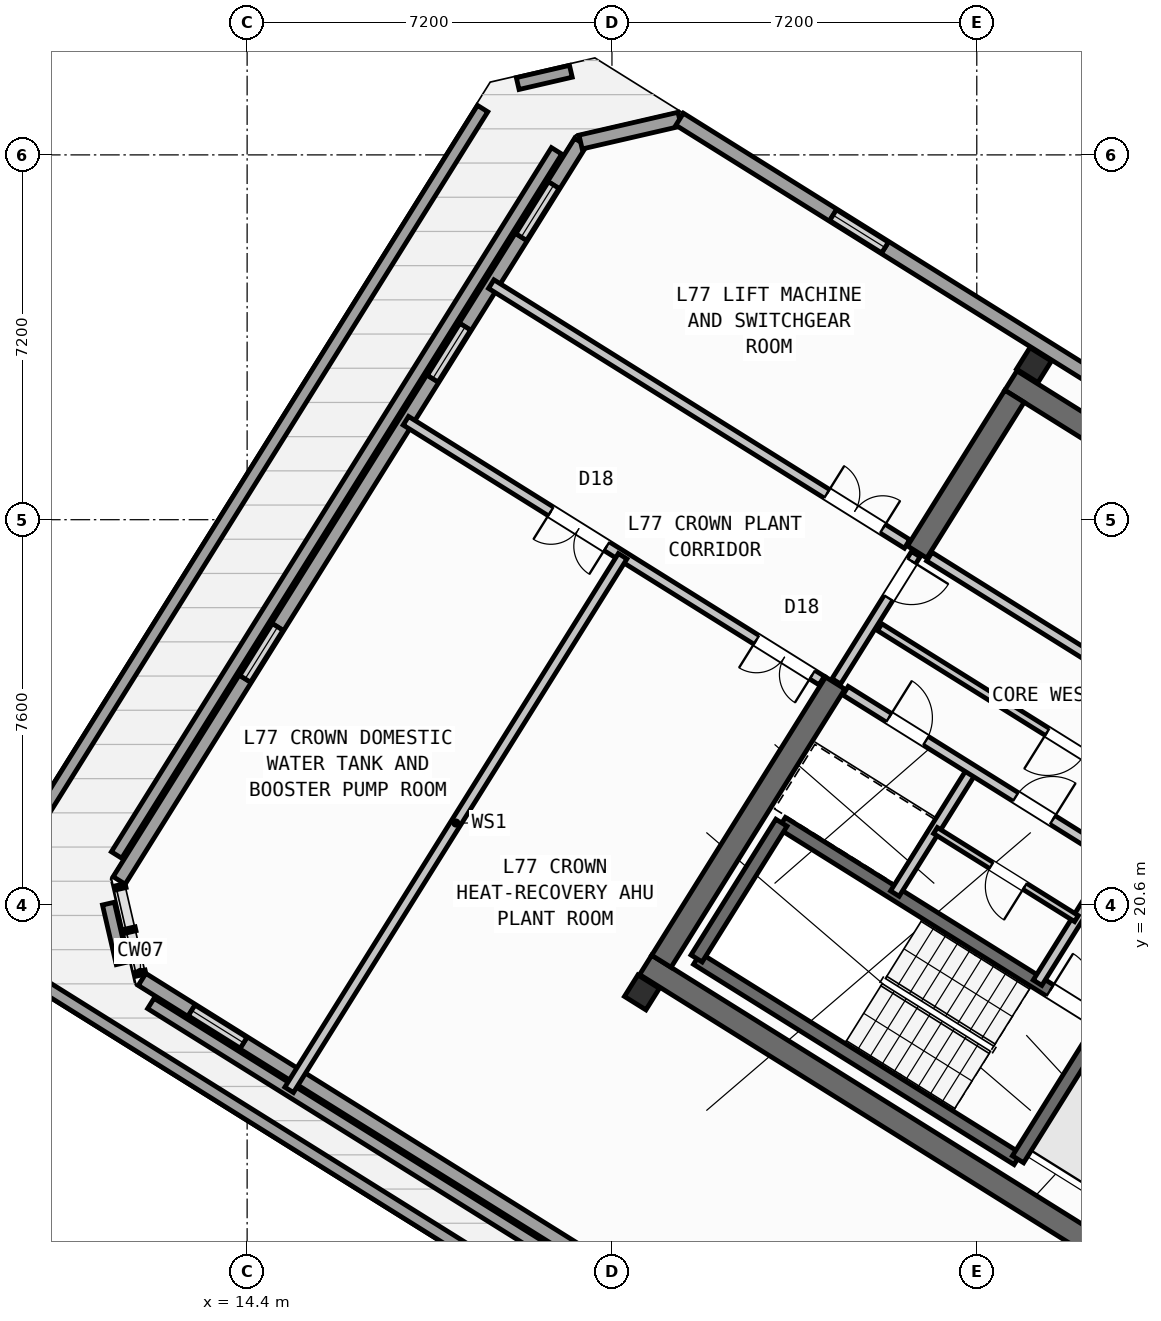
"""IFC4 building model, lengths in metres.
Left out: names, types, materials, properties, quantities, classifications, styles, units other than length and angle.
Written with IfcOpenShell. Run it as: python <this file> out.ifc"""

import sys

from ifc_helpers import new_model, si_unit, direction, frame, frame_2d, origin, origin_2d, place, context, subcontext, project, spatial, rectangle, hollow_rectangle, extrude, source, transform, mapped, element, fill, save


model = new_model("IFC4")
c1 = context("Model", 3, precision=1e-05, world=origin(), true_north=direction((0.0, 1.0)))
c2 = subcontext(c1, "Body", "Model", "MODEL_VIEW")
j1 = project(units=[si_unit("LENGTHUNIT", "METRE"), si_unit("PLANEANGLEUNIT", "RADIAN")], contexts=[c1])
p1 = place(None, origin())
s1 = spatial("IfcSite", under=j1, at=p1, CompositionType="ELEMENT")
p2 = place(p1, origin())
s2 = spatial("IfcBuilding", under=s1, at=p2, CompositionType="ELEMENT")
p3 = place(p2, frame((0.0, 0.0, 302.4)))
s3 = spatial("IfcBuildingStorey", under=s2, at=p3, CompositionType="ELEMENT", Elevation=302.4)
p4 = place(p3, frame((40.531, 24.036, 0.0), z_axis=(0.0, 0.0, 1.0), x_axis=(-0.848048787466, 0.529918157905, 0.0)))
e1 = element("IfcWall", 1, at=p4, inside=s3, PredefinedType="SHEAR", context=c2, shape_type="SweptSolid", body=[
    extrude(rectangle(XDim=13.04, YDim=0.45, at=frame_2d((6.52, 0.0))), origin(), (0.0, 0.0, 1.0), 3.32),
])
p5 = place(p3, frame((33.324, 12.503, 0.0), z_axis=(0.0, 0.0, 1.0), x_axis=(-0.848043529849, 0.529926571782, 0.0)))
e2 = element("IfcWall", 2, at=p5, inside=s3, PredefinedType="SHEAR", context=c2, shape_type="SweptSolid", body=[
    extrude(rectangle(XDim=13.04, YDim=0.45, at=frame_2d((6.52, 0.0))), origin(), (0.0, 0.0, 1.0), 3.32),
])
p6 = place(p3, frame((29.544, 30.636, 0.0), z_axis=(0.0, 0.0, 1.0), x_axis=(-0.529902075036, -0.848058836916, 0.0)))
e3 = element("IfcWall", 3, at=p6, inside=s3, PredefinedType="SHEAR", context=c2, shape_type="SweptSolid", body=[
    extrude(rectangle(XDim=3.625, YDim=0.45, at=frame_2d((1.812, 0.0))), origin(), (0.0, 0.0, 1.0), 3.32),
])
p7 = place(p3, frame((26.007, 24.976, 0.0), z_axis=(0.0, 0.0, 1.0), x_axis=(-0.529931155655, -0.848040665456, 0.0)))
e4 = element("IfcWall", 4, at=p7, inside=s3, PredefinedType="SHEAR", context=c2, shape_type="SweptSolid", body=[
    extrude(rectangle(XDim=6.475, YDim=0.45, at=frame_2d((3.238, 0.0))), origin(), (0.0, 0.0, 1.0), 3.32),
])
m1 = source(origin(), c2, "Body", "SweptSolid", [
    extrude(hollow_rectangle(XDim=0.5, YDim=0.5, WallThickness=0.025, at=origin_2d()), origin(), (0.0, 0.0, 1.0), 3.6),
])
for number, where, z_axis, x_axis in (
    (5, (29.928, 31.251, 0.0), (0.0, 0.0, 1.0), (-0.848, 0.53, 0.0)),
    (6, (22.191, 18.87, 0.0), (0.0, 0.0, 1.0), (-0.848, 0.53, 0.0)),
):
    element("IfcColumn", number, at=place(p3, frame(where, z_axis=z_axis, x_axis=x_axis)), inside=s3, PredefinedType="COLUMN", context=c2, shape_type="MappedRepresentation", body=[
        mapped(m1, transform((0.0, 0.0, 0.0), scale=1.0)),
    ])
p8 = place(p3, frame((29.124, 7.286, 0.0), z_axis=(0.0, 0.0, 1.0), x_axis=(-0.848048671495, 0.529918343499, 0.0)))
e7 = element("IfcWall", 7, at=p8, inside=s3, PredefinedType="PARAPET", context=c2, shape_type="SweptSolid", body=[
    extrude(rectangle(XDim=22.056, YDim=0.24, at=frame_2d((11.028, 0.0))), origin(), (0.0, 0.0, 1.0), 1.15),
])
p9 = place(p3, frame((9.824, 21.553, 0.0), z_axis=(0.0, 0.0, 1.0), x_axis=(0.529923289052, 0.848045581157, 0.0)))
e8 = element("IfcWall", 8, at=p9, inside=s3, PredefinedType="PARAPET", context=c2, shape_type="SweptSolid", body=[
    extrude(rectangle(XDim=17.406, YDim=0.24, at=frame_2d((8.703, 0.0))), origin(), (0.0, 0.0, 1.0), 1.15),
])
p10 = place(p3, frame((19.74, 36.808, 0.0), z_axis=(0.0, 0.0, 1.0), x_axis=(0.974395015602, 0.224842953123, 0.0)))
e9 = element("IfcWall", 9, at=p10, inside=s3, PredefinedType="PARAPET", context=c2, shape_type="SweptSolid", body=[
    extrude(rectangle(XDim=1.077, YDim=0.24, at=frame_2d((0.539, 0.0))), origin(), (0.0, 0.0, 1.0), 1.15),
])
p11 = place(p3, frame((20.507, 35.48, 0.0), z_axis=(0.0, 0.0, 1.0), x_axis=(-0.529914569967, -0.848051029442, 0.0)))
e10 = element("IfcWall", 10, at=p11, inside=s3, PredefinedType="PARAPET", context=c2, shape_type="SweptSolid", body=[
    extrude(rectangle(XDim=16.387, YDim=0.24, at=frame_2d((8.194, 0.0))), origin(), (0.0, 0.0, 1.0), 1.15),
])
p12 = place(p3, frame((11.663, 20.623, 0.0), z_axis=(0.0, 0.0, 1.0), x_axis=(0.224815250156, -0.974401407684, 0.0)))
e11 = element("IfcWall", 11, at=p12, inside=s3, PredefinedType="PARAPET", context=c2, shape_type="SweptSolid", body=[
    extrude(rectangle(XDim=1.209, YDim=0.24, at=frame_2d((0.604, 0.0))), origin(), (0.0, 0.0, 1.0), 1.15),
])
p13 = place(p3, frame((12.5, 18.652, 0.0), z_axis=(0.0, 0.0, 1.0), x_axis=(0.848048578208, -0.529918492789, 0.0)))
e12 = element("IfcWall", 12, at=p13, inside=s3, PredefinedType="PARAPET", context=c2, shape_type="SweptSolid", body=[
    extrude(rectangle(XDim=20.187, YDim=0.24, at=frame_2d((10.094, 0.0))), origin(), (0.0, 0.0, 1.0), 1.15),
])
p14 = place(p3, frame((30.122, 8.007, 0.0), z_axis=(0.0, 0.0, 1.0), x_axis=(-0.848046669074, 0.529921548036, 0.0)))
e13 = element("IfcWall", 13, at=p14, inside=s3, PredefinedType="STANDARD", context=c2, shape_type="SweptSolid", body=[
    extrude(rectangle(XDim=20.984, YDim=0.28, at=frame_2d((10.492, 0.0))), origin(), (0.0, 0.0, 1.0), 3.32),
])
p15 = place(p14, frame((8.009, 0.0, 0.95)))
e14 = element("IfcOpeningElement", 14, at=p15, cuts=e13, PredefinedType="OPENING", context=c2, shape_type="SweptSolid", body=[
    extrude(rectangle(XDim=1.25, YDim=1.4, at=frame_2d((0.625, 0.7))), frame((0.0, 0.15, 0.0), z_axis=(0.0, -1.0, 0.0), x_axis=(1.0, 0.0, 0.0)), (0.0, 0.0, 1.0), 0.3),
])
p16 = place(p14, frame((18.601, 0.0, 0.95)))
e15 = element("IfcOpeningElement", 15, at=p16, cuts=e13, PredefinedType="OPENING", context=c2, shape_type="SweptSolid", body=[
    extrude(rectangle(XDim=1.25, YDim=1.4, at=frame_2d((0.625, 0.7))), frame((0.0, 0.15, 0.0), z_axis=(0.0, -1.0, 0.0), x_axis=(1.0, 0.0, 0.0)), (0.0, 0.0, 1.0), 0.3),
])
p17 = place(p3, frame((11.875, 21.081, 0.0), z_axis=(0.0, 0.0, 1.0), x_axis=(0.529924867514, 0.848044594812, 0.0)))
e16 = element("IfcWall", 16, at=p17, inside=s3, PredefinedType="STANDARD", context=c2, shape_type="SweptSolid", body=[
    extrude(rectangle(XDim=17.184, YDim=0.28, at=frame_2d((8.592, 0.0))), origin(), (0.0, 0.0, 1.0), 3.32),
])
p18 = place(p17, frame((4.671, 0.0, 0.95)))
e17 = element("IfcOpeningElement", 17, at=p18, cuts=e16, PredefinedType="OPENING", context=c2, shape_type="SweptSolid", body=[
    extrude(rectangle(XDim=1.25, YDim=1.4, at=frame_2d((0.625, 0.7))), frame((0.0, 0.15, 0.0), z_axis=(0.0, -1.0, 0.0), x_axis=(1.0, 0.0, 0.0)), (0.0, 0.0, 1.0), 0.3),
])
p19 = place(p17, frame((11.657, 0.0, 0.95)))
e18 = element("IfcOpeningElement", 18, at=p19, cuts=e16, PredefinedType="OPENING", context=c2, shape_type="SweptSolid", body=[
    extrude(rectangle(XDim=1.25, YDim=1.4, at=frame_2d((0.625, 0.7))), frame((0.0, 0.15, 0.0), z_axis=(0.0, -1.0, 0.0), x_axis=(1.0, 0.0, 0.0)), (0.0, 0.0, 1.0), 0.3),
])
p20 = place(p17, frame((14.953, 0.0, 0.95)))
e19 = element("IfcOpeningElement", 19, at=p20, cuts=e16, PredefinedType="OPENING", context=c2, shape_type="SweptSolid", body=[
    extrude(rectangle(XDim=1.25, YDim=1.4, at=frame_2d((0.625, 0.7))), frame((0.0, 0.15, 0.0), z_axis=(0.0, -1.0, 0.0), x_axis=(1.0, 0.0, 0.0)), (0.0, 0.0, 1.0), 0.3),
])
p21 = place(p3, frame((20.981, 35.653, 0.0), z_axis=(0.0, 0.0, 1.0), x_axis=(0.974360407225, 0.224992881738, 0.0)))
e20 = element("IfcWall", 20, at=p21, inside=s3, PredefinedType="STANDARD", context=c2, shape_type="SweptSolid", body=[
    extrude(rectangle(XDim=2.005, YDim=0.28, at=frame_2d((1.003, 0.0))), origin(), (0.0, 0.0, 1.0), 3.32),
])
p22 = place(p3, frame((22.935, 36.104, 0.0), z_axis=(0.0, 0.0, 1.0), x_axis=(0.848046669074, -0.529921548036, 0.0)))
e21 = element("IfcWall", 21, at=p22, inside=s3, PredefinedType="STANDARD", context=c2, shape_type="SweptSolid", body=[
    extrude(rectangle(XDim=20.984, YDim=0.28, at=frame_2d((10.492, 0.0))), origin(), (0.0, 0.0, 1.0), 3.32),
])
p23 = place(p22, frame((3.551, 0.0, 0.95)))
e22 = element("IfcOpeningElement", 22, at=p23, cuts=e21, PredefinedType="OPENING", context=c2, shape_type="SweptSolid", body=[
    extrude(rectangle(XDim=1.25, YDim=1.4, at=frame_2d((0.625, 0.7))), frame((0.0, 0.15, 0.0), z_axis=(0.0, -1.0, 0.0), x_axis=(1.0, 0.0, 0.0)), (0.0, 0.0, 1.0), 0.3),
])
p24 = place(p22, frame((14.193, 0.0, 0.95)))
e23 = element("IfcOpeningElement", 23, at=p24, cuts=e21, PredefinedType="OPENING", context=c2, shape_type="SweptSolid", body=[
    extrude(rectangle(XDim=1.25, YDim=1.4, at=frame_2d((0.625, 0.7))), frame((0.0, 0.15, 0.0), z_axis=(0.0, -1.0, 0.0), x_axis=(1.0, 0.0, 0.0)), (0.0, 0.0, 1.0), 0.3),
])
p25 = place(p3, frame((29.605, 15.581, 0.0), z_axis=(0.0, 0.0, 1.0), x_axis=(-0.848036911448, 0.529937163087, 0.0)))
e24 = element("IfcWall", 24, at=p25, inside=s3, PredefinedType="SHEAR", context=c2, shape_type="SweptSolid", body=[
    extrude(rectangle(XDim=7.46, YDim=0.26, at=frame_2d((3.73, 0.0))), origin(), (0.0, 0.0, 1.0), 3.32),
])
p26 = place(p3, frame((31.28, 18.261, 0.0), z_axis=(0.0, 0.0, 1.0), x_axis=(-0.848051618787, 0.529913626805, 0.0)))
e25 = element("IfcWall", 25, at=p26, inside=s3, PredefinedType="SHEAR", context=c2, shape_type="SweptSolid", body=[
    extrude(rectangle(XDim=7.46, YDim=0.26, at=frame_2d((3.73, 0.0))), origin(), (0.0, 0.0, 1.0), 3.32),
])
p27 = place(p26, frame((0.36, 0.0, 0.0)))
e26 = element("IfcOpeningElement", 26, at=p27, cuts=e25, PredefinedType="OPENING", context=c2, shape_type="SweptSolid", body=[
    extrude(rectangle(XDim=0.86, YDim=2.05, at=frame_2d((0.43, 1.025))), frame((0.0, 0.14, 0.0), z_axis=(0.0, -1.0, 0.0), x_axis=(1.0, 0.0, 0.0)), (0.0, 0.0, 1.0), 0.28),
])
p28 = place(p3, frame((31.288, 18.256, 0.0), z_axis=(0.0, 0.0, 1.0), x_axis=(-0.529943379326, -0.848033026897, 0.0)))
e27 = element("IfcWall", 27, at=p28, inside=s3, PredefinedType="SHEAR", context=c2, shape_type="SweptSolid", body=[
    extrude(rectangle(XDim=3.16, YDim=0.26, at=frame_2d((1.58, 0.0))), origin(), (0.0, 0.0, 1.0), 3.32),
])
p29 = place(p3, frame((24.945, 22.22, 0.0), z_axis=(0.0, 0.0, 1.0), x_axis=(-0.529908658664, -0.84805472316, 0.0)))
e28 = element("IfcWall", 28, at=p29, inside=s3, PredefinedType="SHEAR", context=c2, shape_type="SweptSolid", body=[
    extrude(rectangle(XDim=3.16, YDim=0.26, at=frame_2d((1.58, 0.0))), origin(), (0.0, 0.0, 1.0), 3.32),
])
p30 = place(p3, frame((31.822, 24.998, 0.0), z_axis=(0.0, 0.0, 1.0), x_axis=(-0.848054125777, 0.529909614701, 0.0)))
e29 = element("IfcWall", 29, at=p30, inside=s3, PredefinedType="STANDARD", context=c2, shape_type="SweptSolid", body=[
    extrude(rectangle(XDim=4.668, YDim=0.2, at=frame_2d((2.334, 0.0))), origin(), (0.0, 0.0, 1.0), 3.31),
])
p31 = place(p3, frame((32.108, 22.814, 0.0), z_axis=(0.0, 0.0, 1.0), x_axis=(-0.848047283855, 0.529920564185, 0.0)))
e30 = element("IfcWall", 30, at=p31, inside=s3, PredefinedType="PARTITIONING", context=c2, shape_type="SweptSolid", body=[
    extrude(rectangle(XDim=6.16, YDim=0.16, at=frame_2d((3.08, 0.0))), origin(), (0.0, 0.0, 1.0), 3.31),
])
p32 = place(p31, frame((1.4, 0.0, 0.0)))
e31 = element("IfcOpeningElement", 31, at=p32, cuts=e30, PredefinedType="OPENING", context=c2, shape_type="SweptSolid", body=[
    extrude(rectangle(XDim=0.86, YDim=2.05, at=frame_2d((0.43, 1.025))), frame((0.0, 0.09, 0.0), z_axis=(0.0, -1.0, 0.0), x_axis=(1.0, 0.0, 0.0)), (0.0, 0.0, 1.0), 0.18),
])
for number, where, z_axis, x_axis in (
    (32, (31.525, 21.504, 0.0), (0.0, 0.0, 1.0), (-0.53, -0.848, 0.0)),
    (33, (28.71, 23.263, 0.0), (0.0, 0.0, 1.0), (-0.53, -0.848, 0.0)),
):
    element("IfcWall", number, at=place(p3, frame(where, z_axis=z_axis, x_axis=x_axis)), inside=s3, PredefinedType="STANDARD", context=c2, shape_type="SweptSolid", body=[
        extrude(rectangle(XDim=2.88, YDim=0.2, at=frame_2d((1.44, 0.0))), origin(), (0.0, 0.0, 1.0), 3.31),
    ])
p33 = place(p3, frame((31.525, 21.504, 0.0), z_axis=(0.0, 0.0, 1.0), x_axis=(-0.848042066329, 0.529928913853, 0.0)))
e34 = element("IfcWall", 34, at=p33, inside=s3, PredefinedType="STANDARD", context=c2, shape_type="SweptSolid", body=[
    extrude(rectangle(XDim=6.268, YDim=0.2, at=frame_2d((3.134, 0.0))), origin(), (0.0, 0.0, 1.0), 3.31),
])
p34 = place(p33, frame((4.4, 0.0, 0.0)))
e35 = element("IfcOpeningElement", 35, at=p34, cuts=e34, PredefinedType="OPENING", context=c2, shape_type="SweptSolid", body=[
    extrude(rectangle(XDim=0.86, YDim=2.05, at=frame_2d((0.43, 1.025))), frame((0.0, 0.11, 0.0), z_axis=(0.0, -1.0, 0.0), x_axis=(1.0, 0.0, 0.0)), (0.0, 0.0, 1.0), 0.22),
])
p35 = place(p33, frame((1.45, 0.0, 0.0)))
e36 = element("IfcOpeningElement", 36, at=p35, cuts=e34, PredefinedType="OPENING", context=c2, shape_type="SweptSolid", body=[
    extrude(rectangle(XDim=0.86, YDim=2.05, at=frame_2d((0.43, 1.025))), frame((0.0, 0.11, 0.0), z_axis=(0.0, -1.0, 0.0), x_axis=(1.0, 0.0, 0.0)), (0.0, 0.0, 1.0), 0.22),
])
p36 = place(p3, frame((30.766, 20.327, 0.0), z_axis=(0.0, 0.0, 1.0), x_axis=(-0.848052663127, 0.529911955482, 0.0)))
e37 = element("IfcWall", 37, at=p36, inside=s3, PredefinedType="PLUMBINGWALL", context=c2, shape_type="SweptSolid", body=[
    extrude(rectangle(XDim=3.28, YDim=0.14, at=frame_2d((1.64, 0.0))), origin(), (0.0, 0.0, 1.0), 3.31),
])
p37 = place(p36, frame((1.2, 0.0, 0.0)))
e38 = element("IfcOpeningElement", 38, at=p37, cuts=e37, PredefinedType="OPENING", context=c2, shape_type="SweptSolid", body=[
    extrude(rectangle(XDim=0.78, YDim=2.05, at=frame_2d((0.39, 1.025))), frame((0.0, 0.08, 0.0), z_axis=(0.0, -1.0, 0.0), x_axis=(1.0, 0.0, 0.0)), (0.0, 0.0, 1.0), 0.16),
])
p38 = place(p3, frame((27.596, 27.52, 0.0), z_axis=(0.0, 0.0, 1.0), x_axis=(-0.529865479138, -0.848081702443, 0.0)))
e39 = element("IfcWall", 39, at=p38, inside=s3, PredefinedType="STANDARD", context=c2, shape_type="SweptSolid", body=[
    extrude(rectangle(XDim=2.96, YDim=0.2, at=frame_2d((1.48, 0.0))), origin(), (0.0, 0.0, 1.0), 3.31),
])
p39 = place(p38, frame((0.16, 0.0, 0.0)))
e40 = element("IfcOpeningElement", 40, at=p39, cuts=e39, PredefinedType="OPENING", context=c2, shape_type="SweptSolid", body=[
    extrude(rectangle(XDim=0.86, YDim=2.05, at=frame_2d((0.43, 1.025))), frame((0.0, 0.11, 0.0), z_axis=(0.0, -1.0, 0.0), x_axis=(1.0, 0.0, 0.0)), (0.0, 0.0, 1.0), 0.22),
])
p40 = place(p3, frame((25.74, 25.025, 0.0), z_axis=(0.0, 0.0, 1.0), x_axis=(-0.848050737672, 0.529915036902, 0.0)))
e41 = element("IfcWall", 41, at=p40, inside=s3, PredefinedType="STANDARD", context=c2, shape_type="SweptSolid", body=[
    extrude(rectangle(XDim=9.678, YDim=0.2, at=frame_2d((4.839, 0.0))), origin(), (0.0, 0.0, 1.0), 3.31),
])
p41 = place(p40, frame((0.218, 0.0, 0.0)))
e42 = element("IfcOpeningElement", 42, at=p41, cuts=e41, PredefinedType="OPENING", context=c2, shape_type="SweptSolid", body=[
    extrude(rectangle(XDim=1.3, YDim=2.15, at=frame_2d((0.65, 1.075))), frame((0.0, 0.11, 0.0), z_axis=(0.0, -1.0, 0.0), x_axis=(1.0, 0.0, 0.0)), (0.0, 0.0, 1.0), 0.22),
])
p42 = place(p40, frame((5.003, 0.0, 0.0)))
e43 = element("IfcOpeningElement", 43, at=p42, cuts=e41, PredefinedType="OPENING", context=c2, shape_type="SweptSolid", body=[
    extrude(rectangle(XDim=1.3, YDim=2.15, at=frame_2d((0.65, 1.075))), frame((0.0, 0.11, 0.0), z_axis=(0.0, -1.0, 0.0), x_axis=(1.0, 0.0, 0.0)), (0.0, 0.0, 1.0), 0.22),
])
p43 = place(p3, frame((21.811, 27.48, 0.0), z_axis=(0.0, 0.0, 1.0), x_axis=(-0.529917658534, -0.848049099506, 0.0)))
e44 = element("IfcWall", 44, at=p43, inside=s3, PredefinedType="STANDARD", context=c2, shape_type="SweptSolid", body=[
    extrude(rectangle(XDim=12.42, YDim=0.2, at=frame_2d((6.21, 0.0))), origin(), (0.0, 0.0, 1.0), 3.31),
])
p44 = place(p3, frame((27.425, 27.721, 0.0), z_axis=(0.0, 0.0, 1.0), x_axis=(-0.848057821392, 0.529903700285, 0.0)))
e45 = element("IfcWall", 45, at=p44, inside=s3, PredefinedType="STANDARD", context=c2, shape_type="SweptSolid", body=[
    extrude(rectangle(XDim=9.678, YDim=0.2, at=frame_2d((4.839, 0.0))), origin(), (0.0, 0.0, 1.0), 3.31),
])
p45 = place(p44, frame((0.568, 0.0, 0.0)))
e46 = element("IfcOpeningElement", 46, at=p45, cuts=e45, PredefinedType="OPENING", context=c2, shape_type="SweptSolid", body=[
    extrude(rectangle(XDim=1.3, YDim=2.15, at=frame_2d((0.65, 1.075))), frame((0.0, 0.11, 0.0), z_axis=(0.0, -1.0, 0.0), x_axis=(1.0, 0.0, 0.0)), (0.0, 0.0, 1.0), 0.22),
])
m2 = source(origin(), c2, "Body", "SweptSolid", [
    extrude(rectangle(XDim=1.25, YDim=1.4, at=frame_2d((0.625, 0.7))), frame((0.0, 0.03, 0.0), z_axis=(0.0, -1.0, 0.0), x_axis=(1.0, 0.0, 0.0)), (0.0, 0.0, 1.0), 0.06),
])
p46 = place(p16, origin())
e47 = element("IfcWindow", 47, at=p46, inside=s3, PartitioningType="SINGLE_PANEL", PredefinedType="WINDOW", context=c2, shape_type="MappedRepresentation", body=[
    mapped(m2, transform((0.0, 0.0, 0.0), scale=1.0)),
])
fill(e15, e47)
p47 = place(p18, origin())
e48 = element("IfcWindow", 48, at=p47, inside=s3, PartitioningType="SINGLE_PANEL", PredefinedType="WINDOW", context=c2, shape_type="MappedRepresentation", body=[
    mapped(m2, transform((0.0, 0.0, 0.0), scale=1.0)),
])
fill(e17, e48)
p48 = place(p19, origin())
e49 = element("IfcWindow", 49, at=p48, inside=s3, PartitioningType="SINGLE_PANEL", PredefinedType="WINDOW", context=c2, shape_type="MappedRepresentation", body=[
    mapped(m2, transform((0.0, 0.0, 0.0), scale=1.0)),
])
fill(e18, e49)
p49 = place(p20, origin())
e50 = element("IfcWindow", 50, at=p49, inside=s3, PartitioningType="SINGLE_PANEL", PredefinedType="WINDOW", context=c2, shape_type="MappedRepresentation", body=[
    mapped(m2, transform((0.0, 0.0, 0.0), scale=1.0)),
])
fill(e19, e50)
p50 = place(p23, origin())
e51 = element("IfcWindow", 51, at=p50, inside=s3, PartitioningType="SINGLE_PANEL", PredefinedType="WINDOW", context=c2, shape_type="MappedRepresentation", body=[
    mapped(m2, transform((0.0, 0.0, 0.0), scale=1.0)),
])
fill(e22, e51)
m3 = source(origin(), c2, "Body", "SweptSolid", [
    extrude(rectangle(XDim=0.86, YDim=2.05, at=frame_2d((0.43, 1.025))), frame((0.0, 0.025, 0.0), z_axis=(0.0, -1.0, 0.0), x_axis=(1.0, 0.0, 0.0)), (0.0, 0.0, 1.0), 0.05),
])
p51 = place(p27, frame((0.86, 0.0, 0.0), z_axis=(0.0, 0.0, 1.0), x_axis=(-1.0, 0.0, 0.0)))
e52 = element("IfcDoor", 52, at=p51, inside=s3, OperationType="SINGLE_SWING_LEFT", PredefinedType="DOOR", context=c2, shape_type="MappedRepresentation", body=[
    mapped(m3, transform((0.0, 0.0, 0.0), scale=1.0)),
])
fill(e26, e52)
p52 = place(p32, origin())
e53 = element("IfcDoor", 53, at=p52, inside=s3, OperationType="SINGLE_SWING_RIGHT", PredefinedType="DOOR", context=c2, shape_type="MappedRepresentation", body=[
    mapped(m3, transform((0.0, 0.0, 0.0), scale=1.0)),
])
fill(e31, e53)
p53 = place(p34, frame((0.86, 0.0, 0.0), z_axis=(0.0, 0.0, 1.0), x_axis=(-1.0, 0.0, 0.0)))
e54 = element("IfcDoor", 54, at=p53, inside=s3, OperationType="SINGLE_SWING_LEFT", PredefinedType="DOOR", context=c2, shape_type="MappedRepresentation", body=[
    mapped(m3, transform((0.0, 0.0, 0.0), scale=1.0)),
])
fill(e35, e54)
p54 = place(p35, frame((0.86, 0.0, 0.0), z_axis=(0.0, 0.0, 1.0), x_axis=(-1.0, 0.0, 0.0)))
e55 = element("IfcDoor", 55, at=p54, inside=s3, OperationType="SINGLE_SWING_RIGHT", PredefinedType="DOOR", context=c2, shape_type="MappedRepresentation", body=[
    mapped(m3, transform((0.0, 0.0, 0.0), scale=1.0)),
])
fill(e36, e55)
m4 = source(origin(), c2, "Body", "SweptSolid", [
    extrude(rectangle(XDim=0.78, YDim=2.05, at=frame_2d((0.39, 1.025))), frame((0.0, 0.025, 0.0), z_axis=(0.0, -1.0, 0.0), x_axis=(1.0, 0.0, 0.0)), (0.0, 0.0, 1.0), 0.05),
])
p55 = place(p37, origin())
e56 = element("IfcDoor", 56, at=p55, inside=s3, OperationType="SINGLE_SWING_LEFT", PredefinedType="DOOR", context=c2, shape_type="MappedRepresentation", body=[
    mapped(m4, transform((0.0, 0.0, 0.0), scale=1.0)),
])
fill(e38, e56)
p56 = place(p39, origin())
e57 = element("IfcDoor", 57, at=p56, inside=s3, OperationType="SINGLE_SWING_LEFT", PredefinedType="DOOR", context=c2, shape_type="MappedRepresentation", body=[
    mapped(m3, transform((0.0, 0.0, 0.0), scale=1.0)),
])
fill(e40, e57)
m5 = source(origin(), c2, "Body", "SweptSolid", [
    extrude(rectangle(XDim=1.3, YDim=2.15, at=frame_2d((0.65, 1.075))), frame((0.0, 0.025, 0.0), z_axis=(0.0, -1.0, 0.0), x_axis=(1.0, 0.0, 0.0)), (0.0, 0.0, 1.0), 0.05),
])
p57 = place(p41, origin())
e58 = element("IfcDoor", 58, at=p57, inside=s3, OperationType="DOUBLE_DOOR_SINGLE_SWING", PredefinedType="DOOR", context=c2, shape_type="MappedRepresentation", body=[
    mapped(m5, transform((0.0, 0.0, 0.0), scale=1.0)),
])
fill(e42, e58)
p58 = place(p42, origin())
e59 = element("IfcDoor", 59, at=p58, inside=s3, OperationType="DOUBLE_DOOR_SINGLE_SWING", PredefinedType="DOOR", context=c2, shape_type="MappedRepresentation", body=[
    mapped(m5, transform((0.0, 0.0, 0.0), scale=1.0)),
])
fill(e43, e59)
p59 = place(p45, frame((1.3, 0.0, 0.0), z_axis=(0.0, 0.0, 1.0), x_axis=(-1.0, 0.0, 0.0)))
e60 = element("IfcDoor", 60, at=p59, inside=s3, OperationType="DOUBLE_DOOR_SINGLE_SWING", PredefinedType="DOOR", context=c2, shape_type="MappedRepresentation", body=[
    mapped(m5, transform((0.0, 0.0, 0.0), scale=1.0)),
])
fill(e46, e60)
save(model, sys.argv[1])
